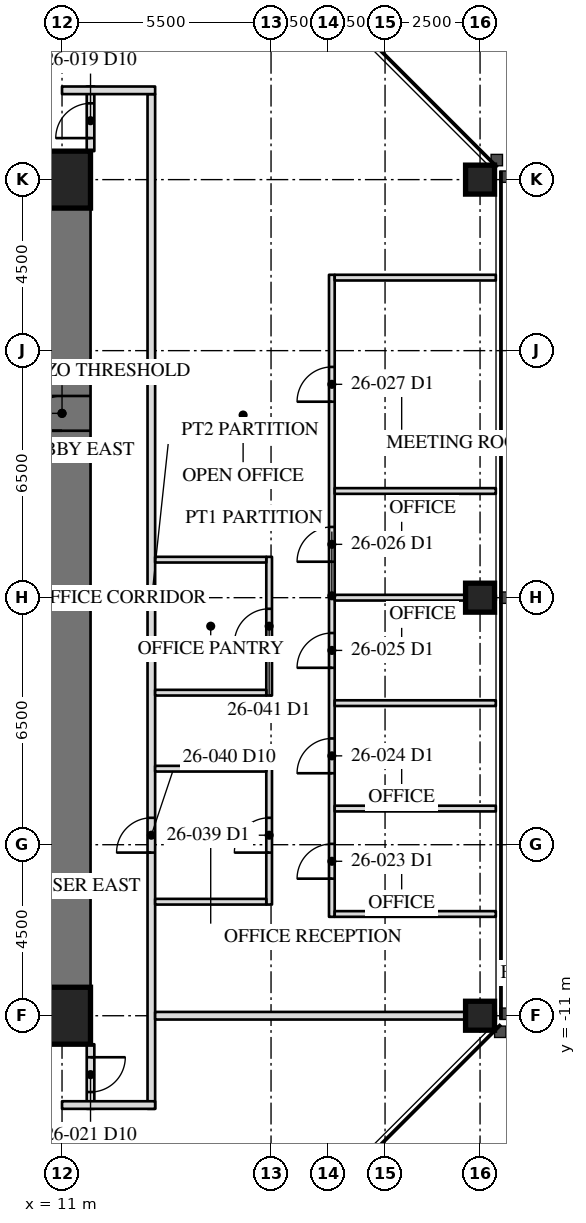
"""IFC4 building model, lengths in metres.
Left out: names, types, materials, properties, quantities, classifications, styles, units other than length and angle.
Written with IfcOpenShell. Run it as: python <this file> out.ifc"""

import sys

from ifc_helpers import new_model, si_unit, direction, frame, frame_2d, origin, origin_2d, place, context, subcontext, project, spatial, rectangle, hollow_rectangle, extrude, element, fill, save


model = new_model("IFC4")
c1 = context("Model", 3, precision=1e-05, world=origin(), true_north=direction((0.0, 1.0)))
c2 = subcontext(c1, "Body", "Model", "MODEL_VIEW")
j1 = project(units=[si_unit("LENGTHUNIT", "METRE"), si_unit("PLANEANGLEUNIT", "RADIAN")], contexts=[c1])
p1 = place(None, origin())
s1 = spatial("IfcSite", under=j1, at=p1, CompositionType="ELEMENT")
p2 = place(p1, origin())
s2 = spatial("IfcBuilding", under=s1, at=p2, CompositionType="ELEMENT")
p3 = place(p2, frame((0.0, 0.0, 113.1)))
s3 = spatial("IfcBuildingStorey", under=s2, at=p3, CompositionType="ELEMENT", Elevation=113.1)
for number, where, z_axis, x_axis in (
    (1, (22.0, -11.0, 0.0), (0.0, 0.0, 1.0), (0.0, 1.0, 0.0)),
    (2, (22.0, 0.0, 0.0), (0.0, 0.0, 1.0), (0.0, 1.0, 0.0)),
    (3, (22.0, 11.0, 0.0), (0.0, 0.0, 1.0), (0.0, 1.0, 0.0)),
):
    element("IfcColumn", number, at=place(p3, frame(where, z_axis=z_axis, x_axis=x_axis)), inside=s3, PredefinedType="COLUMN", context=c2, shape_type="SweptSolid", body=[
        extrude(hollow_rectangle(XDim=0.762, YDim=0.762, WallThickness=0.127, at=origin_2d()), origin(), (0.0, 0.0, 1.0), 4.1),
    ])
p4 = place(p3, frame((11.0, -11.0, 0.0), z_axis=(0.0, 0.0, 1.0), x_axis=(0.0, 1.0, 0.0)))
e4 = element("IfcWall", 4, at=p4, inside=s3, PredefinedType="SHEAR", context=c2, shape_type="SweptSolid", body=[
    extrude(rectangle(XDim=22.0, YDim=1.5, at=frame_2d((11.0, 0.0))), origin(), (0.0, 0.0, 1.0), 4.1),
])
p5 = place(p4, frame((15.393, 0.0, 0.0)))
e5 = element("IfcOpeningElement", 5, at=p5, cuts=e4, PredefinedType="OPENING", context=c2, shape_type="SweptSolid", body=[
    extrude(rectangle(XDim=0.915, YDim=2.134, at=frame_2d((0.458, 1.067))), frame((0.0, 0.76, 0.0), z_axis=(0.0, -1.0, 0.0), x_axis=(1.0, 0.0, 0.0)), (0.0, 0.0, 1.0), 1.52),
])
for number, where, z_axis, x_axis in (
    (6, (11.0, 11.0, 0.0), (0.0, 0.0, 1.0), (-1.0, 0.0, 0.0)),
    (7, (6.5, -11.0, 0.0), (0.0, 0.0, 1.0), (1.0, 0.0, 0.0)),
):
    element("IfcWall", number, at=place(p3, frame(where, z_axis=z_axis, x_axis=x_axis)), inside=s3, PredefinedType="SHEAR", context=c2, shape_type="SweptSolid", body=[
        extrude(rectangle(XDim=4.5, YDim=1.5, at=frame_2d((2.25, 0.0))), origin(), (0.0, 0.0, 1.0), 4.1),
    ])
for number, where, z_axis, x_axis in (
    (8, (11.0, 11.0, 0.0), (0.0, 0.0, 1.0), (1.0, 0.0, 0.0)),
    (9, (11.0, -11.0, 0.0), (0.0, 0.0, 1.0), (1.0, 0.0, 0.0)),
):
    element("IfcColumn", number, at=place(p3, frame(where, z_axis=z_axis, x_axis=x_axis)), inside=s3, PredefinedType="COLUMN", context=c2, shape_type="SweptSolid", body=[
        extrude(hollow_rectangle(XDim=1.499, YDim=1.499, WallThickness=0.102, at=origin_2d()), origin(), (0.0, 0.0, 1.0), 4.1),
    ])
p6 = place(p3, frame((13.35, -13.45, 0.0), z_axis=(0.0, 0.0, 1.0), x_axis=(0.0, 1.0, 0.0)))
e10 = element("IfcWall", 10, at=p6, inside=s3, PredefinedType="PARTITIONING", context=c2, shape_type="SweptSolid", body=[
    extrude(rectangle(XDim=26.7, YDim=0.2, at=frame_2d((13.35, 0.0))), origin(), (0.0, 0.0, 1.0), 3.91),
])
p7 = place(p6, frame((6.742, 0.0, 0.0)))
e11 = element("IfcOpeningElement", 11, at=p7, cuts=e10, PredefinedType="OPENING", context=c2, shape_type="SweptSolid", body=[
    extrude(rectangle(XDim=0.915, YDim=2.134, at=frame_2d((0.458, 1.067))), frame((0.0, 0.11, 0.0), z_axis=(0.0, -1.0, 0.0), x_axis=(1.0, 0.0, 0.0)), (0.0, 0.0, 1.0), 0.22),
])
p8 = place(p3, frame((11.75, 11.75, 0.0), z_axis=(0.0, 0.0, 1.0), x_axis=(0.0, 1.0, 0.0)))
e12 = element("IfcWall", 12, at=p8, inside=s3, PredefinedType="PARTITIONING", context=c2, shape_type="SweptSolid", body=[
    extrude(rectangle(XDim=1.7, YDim=0.2, at=frame_2d((0.85, 0.0))), origin(), (0.0, 0.0, 1.0), 3.91),
])
p9 = place(p8, frame((0.343, 0.0, 0.0)))
e13 = element("IfcOpeningElement", 13, at=p9, cuts=e12, PredefinedType="OPENING", context=c2, shape_type="SweptSolid", body=[
    extrude(rectangle(XDim=0.915, YDim=2.134, at=frame_2d((0.458, 1.067))), frame((0.0, 0.11, 0.0), z_axis=(0.0, -1.0, 0.0), x_axis=(1.0, 0.0, 0.0)), (0.0, 0.0, 1.0), 0.22),
])
p10 = place(p3, frame((11.0, 13.35, 0.0), z_axis=(0.0, 0.0, 1.0), x_axis=(1.0, 0.0, 0.0)))
e14 = element("IfcWall", 14, at=p10, inside=s3, PredefinedType="PARTITIONING", context=c2, shape_type="SweptSolid", body=[
    extrude(rectangle(XDim=2.45, YDim=0.2, at=frame_2d((1.225, 0.0))), origin(), (0.0, 0.0, 1.0), 3.91),
])
p11 = place(p3, frame((11.75, -11.75, 0.0), z_axis=(0.0, 0.0, 1.0), x_axis=(0.0, -1.0, 0.0)))
e15 = element("IfcWall", 15, at=p11, inside=s3, PredefinedType="PARTITIONING", context=c2, shape_type="SweptSolid", body=[
    extrude(rectangle(XDim=1.7, YDim=0.2, at=frame_2d((0.85, 0.0))), origin(), (0.0, 0.0, 1.0), 3.91),
])
p12 = place(p11, frame((0.343, 0.0, 0.0)))
e16 = element("IfcOpeningElement", 16, at=p12, cuts=e15, PredefinedType="OPENING", context=c2, shape_type="SweptSolid", body=[
    extrude(rectangle(XDim=0.915, YDim=2.134, at=frame_2d((0.458, 1.067))), frame((0.0, 0.11, 0.0), z_axis=(0.0, -1.0, 0.0), x_axis=(1.0, 0.0, 0.0)), (0.0, 0.0, 1.0), 0.22),
])
p13 = place(p3, frame((11.0, -13.35, 0.0), z_axis=(0.0, 0.0, 1.0), x_axis=(1.0, 0.0, 0.0)))
e17 = element("IfcWall", 17, at=p13, inside=s3, PredefinedType="PARTITIONING", context=c2, shape_type="SweptSolid", body=[
    extrude(rectangle(XDim=2.45, YDim=0.2, at=frame_2d((1.225, 0.0))), origin(), (0.0, 0.0, 1.0), 3.91),
])
p14 = place(p3, frame((13.45, -11.0, 0.0), z_axis=(0.0, 0.0, 1.0), x_axis=(1.0, 0.0, 0.0)))
e18 = element("IfcWall", 18, at=p14, inside=s3, PredefinedType="PARTITIONING", context=c2, shape_type="SweptSolid", body=[
    extrude(rectangle(XDim=8.965, YDim=0.2, at=frame_2d((4.482, 0.0))), origin(), (0.0, 0.0, 1.0), 3.326),
])
p15 = place(p3, frame((18.1, -8.398, 0.0), z_axis=(0.0, 0.0, 1.0), x_axis=(0.0, 1.0, 0.0)))
e19 = element("IfcWall", 19, at=p15, inside=s3, PredefinedType="PARTITIONING", context=c2, shape_type="SweptSolid", body=[
    extrude(rectangle(XDim=16.894, YDim=0.15, at=frame_2d((8.447, 0.0))), origin(), (0.0, 0.0, 1.0), 3.91),
])
p16 = place(p15, frame((1.004, 0.0, 0.0)))
e20 = element("IfcOpeningElement", 20, at=p16, cuts=e19, PredefinedType="OPENING", context=c2, shape_type="SweptSolid", body=[
    extrude(rectangle(XDim=0.915, YDim=2.134, at=frame_2d((0.458, 1.067))), frame((0.0, 0.085, 0.0), z_axis=(0.0, -1.0, 0.0), x_axis=(1.0, 0.0, 0.0)), (0.0, 0.0, 1.0), 0.17),
])
p17 = place(p15, frame((3.779, 0.0, 0.0)))
e21 = element("IfcOpeningElement", 21, at=p17, cuts=e19, PredefinedType="OPENING", context=c2, shape_type="SweptSolid", body=[
    extrude(rectangle(XDim=0.915, YDim=2.134, at=frame_2d((0.458, 1.067))), frame((0.0, 0.085, 0.0), z_axis=(0.0, -1.0, 0.0), x_axis=(1.0, 0.0, 0.0)), (0.0, 0.0, 1.0), 0.17),
])
p18 = place(p15, frame((6.553, 0.0, 0.0)))
e22 = element("IfcOpeningElement", 22, at=p18, cuts=e19, PredefinedType="OPENING", context=c2, shape_type="SweptSolid", body=[
    extrude(rectangle(XDim=0.915, YDim=2.134, at=frame_2d((0.458, 1.067))), frame((0.0, 0.085, 0.0), z_axis=(0.0, -1.0, 0.0), x_axis=(1.0, 0.0, 0.0)), (0.0, 0.0, 1.0), 0.17),
])
p19 = place(p15, frame((9.344, 0.0, 0.0)))
e23 = element("IfcOpeningElement", 23, at=p19, cuts=e19, PredefinedType="OPENING", context=c2, shape_type="SweptSolid", body=[
    extrude(rectangle(XDim=0.915, YDim=2.134, at=frame_2d((0.458, 1.067))), frame((0.0, 0.085, 0.0), z_axis=(0.0, -1.0, 0.0), x_axis=(1.0, 0.0, 0.0)), (0.0, 0.0, 1.0), 0.17),
])
p20 = place(p15, frame((13.554, 0.0, 0.0)))
e24 = element("IfcOpeningElement", 24, at=p20, cuts=e19, PredefinedType="OPENING", context=c2, shape_type="SweptSolid", body=[
    extrude(rectangle(XDim=0.915, YDim=2.134, at=frame_2d((0.458, 1.067))), frame((0.0, 0.085, 0.0), z_axis=(0.0, -1.0, 0.0), x_axis=(1.0, 0.0, 0.0)), (0.0, 0.0, 1.0), 0.17),
])
for number, where, z_axis, x_axis in (
    (25, (18.175, -8.323, 0.0), (0.0, 0.0, 1.0), (1.0, 0.0, 0.0)),
    (26, (18.175, -5.549, 0.0), (0.0, 0.0, 1.0), (1.0, 0.0, 0.0)),
    (27, (18.175, -2.775, 0.0), (0.0, 0.0, 1.0), (1.0, 0.0, 0.0)),
):
    element("IfcWall", number, at=place(p3, frame(where, z_axis=z_axis, x_axis=x_axis)), inside=s3, PredefinedType="PARTITIONING", context=c2, shape_type="SweptSolid", body=[
        extrude(rectangle(XDim=4.24, YDim=0.15, at=frame_2d((2.12, 0.0))), origin(), (0.0, 0.0, 1.0), 3.91),
    ])
p21 = place(p3, frame((18.175, 0.0, 0.0), z_axis=(0.0, 0.0, 1.0), x_axis=(1.0, 0.0, 0.0)))
e28 = element("IfcWall", 28, at=p21, inside=s3, PredefinedType="PARTITIONING", context=c2, shape_type="SweptSolid", body=[
    extrude(rectangle(XDim=4.24, YDim=0.15, at=frame_2d((2.12, 0.0))), origin(), (0.0, 0.0, 1.0), 3.326),
])
for number, where, z_axis, x_axis in (
    (29, (18.175, 2.807, 0.0), (0.0, 0.0, 1.0), (1.0, 0.0, 0.0)),
    (30, (18.175, 8.421, 0.0), (0.0, 0.0, 1.0), (1.0, 0.0, 0.0)),
):
    element("IfcWall", number, at=place(p3, frame(where, z_axis=z_axis, x_axis=x_axis)), inside=s3, PredefinedType="PARTITIONING", context=c2, shape_type="SweptSolid", body=[
        extrude(rectangle(XDim=4.24, YDim=0.15, at=frame_2d((2.12, 0.0))), origin(), (0.0, 0.0, 1.0), 3.91),
    ])
p22 = place(p3, frame((16.45, -8.075, 0.0), z_axis=(0.0, 0.0, 1.0), x_axis=(0.0, 1.0, 0.0)))
e31 = element("IfcWall", 31, at=p22, inside=s3, PredefinedType="PARTITIONING", context=c2, shape_type="SweptSolid", body=[
    extrude(rectangle(XDim=3.65, YDim=0.15, at=frame_2d((1.825, 0.0))), origin(), (0.0, 0.0, 1.0), 3.91),
])
p23 = place(p22, frame((1.367, 0.0, 0.0)))
e32 = element("IfcOpeningElement", 32, at=p23, cuts=e31, PredefinedType="OPENING", context=c2, shape_type="SweptSolid", body=[
    extrude(rectangle(XDim=0.915, YDim=2.134, at=frame_2d((0.458, 1.067))), frame((0.0, 0.085, 0.0), z_axis=(0.0, -1.0, 0.0), x_axis=(1.0, 0.0, 0.0)), (0.0, 0.0, 1.0), 0.17),
])
for number, where, z_axis, x_axis in (
    (33, (16.375, -8.0, 0.0), (0.0, 0.0, 1.0), (-1.0, 0.0, 0.0)),
    (34, (16.375, -4.5, 0.0), (0.0, 0.0, 1.0), (-1.0, 0.0, 0.0)),
):
    element("IfcWall", number, at=place(p3, frame(where, z_axis=z_axis, x_axis=x_axis)), inside=s3, PredefinedType="PARTITIONING", context=c2, shape_type="SweptSolid", body=[
        extrude(rectangle(XDim=2.925, YDim=0.15, at=frame_2d((1.462, 0.0))), origin(), (0.0, 0.0, 1.0), 3.91),
    ])
p24 = place(p3, frame((16.45, -2.575, 0.0), z_axis=(0.0, 0.0, 1.0), x_axis=(0.0, 1.0, 0.0)))
e35 = element("IfcWall", 35, at=p24, inside=s3, PredefinedType="PARTITIONING", context=c2, shape_type="SweptSolid", body=[
    extrude(rectangle(XDim=3.65, YDim=0.15, at=frame_2d((1.825, 0.0))), origin(), (0.0, 0.0, 1.0), 3.91),
])
p25 = place(p24, frame((1.367, 0.0, 0.0)))
e36 = element("IfcOpeningElement", 36, at=p25, cuts=e35, PredefinedType="OPENING", context=c2, shape_type="SweptSolid", body=[
    extrude(rectangle(XDim=0.915, YDim=2.134, at=frame_2d((0.458, 1.067))), frame((0.0, 0.085, 0.0), z_axis=(0.0, -1.0, 0.0), x_axis=(1.0, 0.0, 0.0)), (0.0, 0.0, 1.0), 0.17),
])
for number, where, z_axis, x_axis in (
    (37, (16.375, -2.5, 0.0), (0.0, 0.0, 1.0), (-1.0, 0.0, 0.0)),
    (38, (16.375, 1.0, 0.0), (0.0, 0.0, 1.0), (-1.0, 0.0, 0.0)),
):
    element("IfcWall", number, at=place(p3, frame(where, z_axis=z_axis, x_axis=x_axis)), inside=s3, PredefinedType="PARTITIONING", context=c2, shape_type="SweptSolid", body=[
        extrude(rectangle(XDim=2.925, YDim=0.15, at=frame_2d((1.462, 0.0))), origin(), (0.0, 0.0, 1.0), 3.91),
    ])
p26 = place(p5, origin())
e39 = element("IfcDoor", 39, at=p26, inside=s3, OperationType="SINGLE_SWING_RIGHT", PredefinedType="DOOR", context=c2, shape_type="SweptSolid", body=[
    extrude(rectangle(XDim=0.915, YDim=2.134, at=frame_2d((0.458, 1.067))), frame((0.0, -0.675, 0.0), z_axis=(0.0, -1.0, 0.0), x_axis=(1.0, 0.0, 0.0)), (0.0, 0.0, 1.0), 0.05),
])
fill(e5, e39)
p27 = place(p9, origin())
e40 = element("IfcDoor", 40, at=p27, inside=s3, OperationType="SINGLE_SWING_LEFT", PredefinedType="DOOR", context=c2, shape_type="SweptSolid", body=[
    extrude(rectangle(XDim=0.915, YDim=2.134, at=frame_2d((0.458, 1.067))), frame((0.0, 0.025, 0.0), z_axis=(0.0, -1.0, 0.0), x_axis=(1.0, 0.0, 0.0)), (0.0, 0.0, 1.0), 0.05),
])
fill(e13, e40)
p28 = place(p12, origin())
e41 = element("IfcDoor", 41, at=p28, inside=s3, OperationType="SINGLE_SWING_LEFT", PredefinedType="DOOR", context=c2, shape_type="SweptSolid", body=[
    extrude(rectangle(XDim=0.915, YDim=2.134, at=frame_2d((0.458, 1.067))), frame((0.0, 0.025, 0.0), z_axis=(0.0, -1.0, 0.0), x_axis=(1.0, 0.0, 0.0)), (0.0, 0.0, 1.0), 0.05),
])
fill(e16, e41)
p29 = place(p16, origin())
e42 = element("IfcDoor", 42, at=p29, inside=s3, OperationType="SINGLE_SWING_LEFT", PredefinedType="DOOR", context=c2, shape_type="SweptSolid", body=[
    extrude(rectangle(XDim=0.915, YDim=2.134, at=frame_2d((0.458, 1.067))), frame((0.0, 0.025, 0.0), z_axis=(0.0, -1.0, 0.0), x_axis=(1.0, 0.0, 0.0)), (0.0, 0.0, 1.0), 0.05),
])
fill(e20, e42)
p30 = place(p17, origin())
e43 = element("IfcDoor", 43, at=p30, inside=s3, OperationType="SINGLE_SWING_LEFT", PredefinedType="DOOR", context=c2, shape_type="SweptSolid", body=[
    extrude(rectangle(XDim=0.915, YDim=2.134, at=frame_2d((0.458, 1.067))), frame((0.0, 0.025, 0.0), z_axis=(0.0, -1.0, 0.0), x_axis=(1.0, 0.0, 0.0)), (0.0, 0.0, 1.0), 0.05),
])
fill(e21, e43)
p31 = place(p18, origin())
e44 = element("IfcDoor", 44, at=p31, inside=s3, OperationType="SINGLE_SWING_LEFT", PredefinedType="DOOR", context=c2, shape_type="SweptSolid", body=[
    extrude(rectangle(XDim=0.915, YDim=2.134, at=frame_2d((0.458, 1.067))), frame((0.0, 0.025, 0.0), z_axis=(0.0, -1.0, 0.0), x_axis=(1.0, 0.0, 0.0)), (0.0, 0.0, 1.0), 0.05),
])
fill(e22, e44)
p32 = place(p19, origin())
e45 = element("IfcDoor", 45, at=p32, inside=s3, OperationType="SINGLE_SWING_LEFT", PredefinedType="DOOR", context=c2, shape_type="SweptSolid", body=[
    extrude(rectangle(XDim=0.915, YDim=2.134, at=frame_2d((0.458, 1.067))), frame((0.0, 0.025, 0.0), z_axis=(0.0, -1.0, 0.0), x_axis=(1.0, 0.0, 0.0)), (0.0, 0.0, 1.0), 0.05),
])
fill(e23, e45)
p33 = place(p20, origin())
e46 = element("IfcDoor", 46, at=p33, inside=s3, OperationType="SINGLE_SWING_LEFT", PredefinedType="DOOR", context=c2, shape_type="SweptSolid", body=[
    extrude(rectangle(XDim=0.915, YDim=2.134, at=frame_2d((0.458, 1.067))), frame((0.0, 0.025, 0.0), z_axis=(0.0, -1.0, 0.0), x_axis=(1.0, 0.0, 0.0)), (0.0, 0.0, 1.0), 0.05),
])
fill(e24, e46)
p34 = place(p23, origin())
e47 = element("IfcDoor", 47, at=p34, inside=s3, OperationType="SINGLE_SWING_LEFT", PredefinedType="DOOR", context=c2, shape_type="SweptSolid", body=[
    extrude(rectangle(XDim=0.915, YDim=2.134, at=frame_2d((0.458, 1.067))), frame((0.0, 0.025, 0.0), z_axis=(0.0, -1.0, 0.0), x_axis=(1.0, 0.0, 0.0)), (0.0, 0.0, 1.0), 0.05),
])
fill(e32, e47)
p35 = place(p7, origin())
e48 = element("IfcDoor", 48, at=p35, inside=s3, OperationType="SINGLE_SWING_LEFT", PredefinedType="DOOR", context=c2, shape_type="SweptSolid", body=[
    extrude(rectangle(XDim=0.915, YDim=2.134, at=frame_2d((0.458, 1.067))), frame((0.0, 0.025, 0.0), z_axis=(0.0, -1.0, 0.0), x_axis=(1.0, 0.0, 0.0)), (0.0, 0.0, 1.0), 0.05),
])
fill(e11, e48)
p36 = place(p25, origin())
e49 = element("IfcDoor", 49, at=p36, inside=s3, OperationType="SINGLE_SWING_LEFT", PredefinedType="DOOR", context=c2, shape_type="SweptSolid", body=[
    extrude(rectangle(XDim=0.915, YDim=2.134, at=frame_2d((0.458, 1.067))), frame((0.0, 0.025, 0.0), z_axis=(0.0, -1.0, 0.0), x_axis=(1.0, 0.0, 0.0)), (0.0, 0.0, 1.0), 0.05),
])
fill(e36, e49)
save(model, sys.argv[1])
